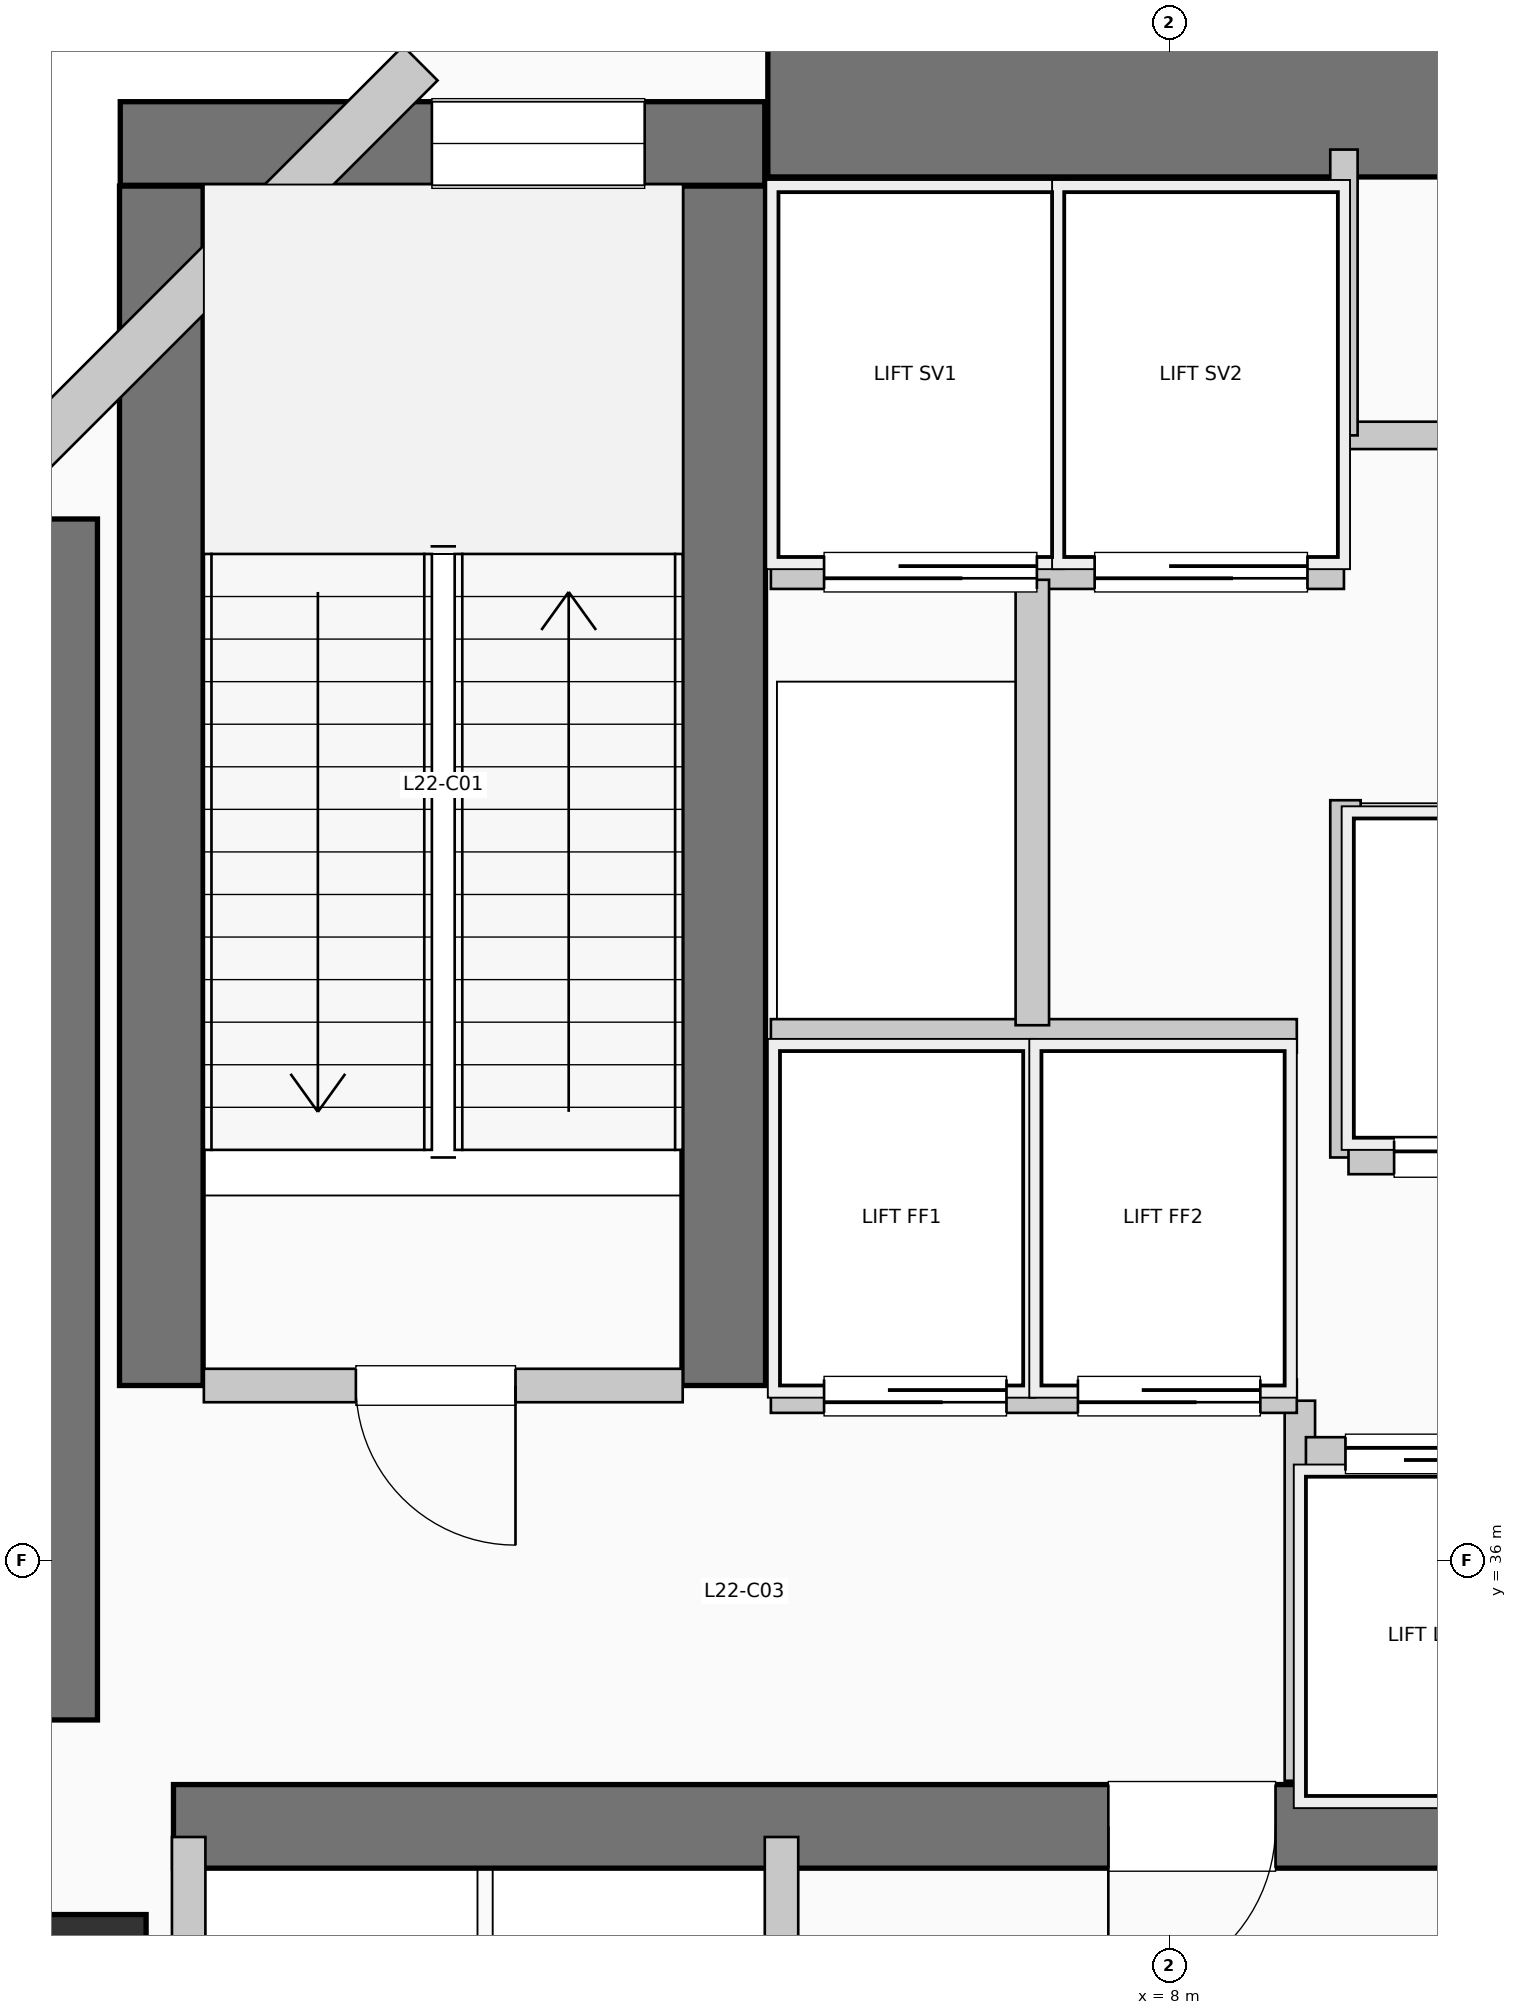
"""IFC4 building model, lengths in metres.
Left out: names, types, materials, properties, quantities, classifications, styles, units other than length and angle.
Written with IfcOpenShell. Run it as: python <this file> out.ifc"""

import sys

from ifc_helpers import new_model, si_unit, direction, frame, frame_2d, origin, origin_2d, place, context, subcontext, project, spatial, rectangle, extrude, element, fill, save


model = new_model("IFC4")
c1 = context("Model", 3, precision=1e-05, world=origin(), true_north=direction((0.0, 1.0)))
c2 = subcontext(c1, "Body", "Model", "MODEL_VIEW")
j1 = project(units=[si_unit("LENGTHUNIT", "METRE"), si_unit("PLANEANGLEUNIT", "RADIAN")], contexts=[c1])
p1 = place(None, origin())
s1 = spatial("IfcSite", under=j1, at=p1, CompositionType="ELEMENT")
p2 = place(p1, origin())
s2 = spatial("IfcBuilding", under=s1, at=p2, CompositionType="ELEMENT")
p3 = place(p2, frame((0.0, 0.0, 93.72)))
s3 = spatial("IfcBuildingStorey", under=s2, at=p3, CompositionType="ELEMENT", Elevation=93.72)
p4 = place(p3, frame((5.36, 45.55, 0.0), z_axis=(0.0, 0.0, 1.0), x_axis=(1.0, 0.0, 0.0)))
e1 = element("IfcWall", 1, at=p4, inside=s3, PredefinedType="SHEAR", context=c2, shape_type="SweptSolid", body=[
    extrude(rectangle(XDim=13.98, YDim=0.9, at=frame_2d((6.99, 0.0))), origin(), (0.0, 0.0, 1.0), 4.95),
])
p5 = place(p3, frame((0.5, 34.95, 0.0), z_axis=(0.0, 0.0, 1.0), x_axis=(0.0, 1.0, 0.0)))
e2 = element("IfcWall", 2, at=p5, inside=s3, PredefinedType="SHEAR", context=c2, shape_type="SweptSolid", body=[
    extrude(rectangle(XDim=7.9, YDim=0.9, at=frame_2d((3.95, 0.0))), origin(), (0.0, 0.0, 1.0), 4.95),
])
p6 = place(p3, frame((1.45, 34.25, 0.0), z_axis=(0.0, 0.0, 1.0), x_axis=(1.0, 0.0, 0.0)))
e3 = element("IfcWall", 3, at=p6, inside=s3, PredefinedType="SHEAR", context=c2, shape_type="SweptSolid", body=[
    extrude(rectangle(XDim=10.71, YDim=0.55, at=frame_2d((5.355, 0.0))), origin(), (0.0, 0.0, 1.0), 4.95),
])
p7 = place(p6, frame((7.25, 0.0, 0.0), z_axis=(0.0, 0.0, 1.0), x_axis=(-1.0, 0.0, 0.0)))
e4 = element("IfcOpeningElement", 4, at=p7, cuts=e3, PredefinedType="OPENING", context=c2, shape_type="SweptSolid", body=[
    extrude(rectangle(XDim=1.1, YDim=2.15, at=frame_2d((0.55, 1.075))), frame((0.0, 0.285, 0.0), z_axis=(0.0, -1.0, 0.0), x_axis=(1.0, 0.0, 0.0)), (0.0, 0.0, 1.0), 0.57),
])
for number, where, z_axis, x_axis in (
    (5, (1.37, 37.15, 0.0), (0.0, 0.0, 1.0), (0.0, 1.0, 0.0)),
    (6, (5.07, 37.15, 0.0), (0.0, 0.0, 1.0), (0.0, 1.0, 0.0)),
):
    element("IfcWall", number, at=place(p3, frame(where, z_axis=z_axis, x_axis=x_axis)), inside=s3, PredefinedType="SHEAR", context=c2, shape_type="SweptSolid", body=[
        extrude(rectangle(XDim=7.89, YDim=0.55, at=frame_2d((3.945, 0.0))), origin(), (0.0, 0.0, 1.0), 4.95),
    ])
p8 = place(p3, frame((1.1, 45.32, 0.0), z_axis=(0.0, 0.0, 1.0), x_axis=(1.0, 0.0, 0.0)))
e7 = element("IfcWall", 7, at=p8, inside=s3, PredefinedType="SHEAR", context=c2, shape_type="SweptSolid", body=[
    extrude(rectangle(XDim=4.24, YDim=0.55, at=frame_2d((2.12, 0.0))), origin(), (0.0, 0.0, 1.0), 4.95),
])
p9 = place(p8, frame((2.05, 0.0, 1.05)))
e8 = element("IfcOpeningElement", 8, at=p9, cuts=e7, PredefinedType="OPENING", context=c2, shape_type="SweptSolid", body=[
    extrude(rectangle(XDim=1.4, YDim=1.8, at=frame_2d((0.7, 0.9))), frame((0.0, 0.285, 0.0), z_axis=(0.0, -1.0, 0.0), x_axis=(1.0, 0.0, 0.0)), (0.0, 0.0, 1.0), 0.57),
])
p10 = place(p3, frame((0.8, 33.2, 0.0), z_axis=(0.0, 0.0, 1.0), x_axis=(1.0, 0.0, 0.0)))
e9 = element("IfcColumn", 9, at=p10, inside=s3, PredefinedType="COLUMN", context=c2, shape_type="SweptSolid", body=[
    extrude(rectangle(XDim=0.94, YDim=0.94, at=origin_2d()), origin(), (0.0, 0.0, 1.0), 4.95),
])
p11 = place(p3, frame((3.074, 45.848, 0.0), z_axis=(0.0, 0.0, 1.0), x_axis=(-0.707106781187, -0.707106781187, 0.0)))
e10 = element("IfcWall", 10, at=p11, inside=s3, PredefinedType="SOLIDWALL", context=c2, shape_type="SweptSolid", body=[
    extrude(rectangle(XDim=4.133, YDim=0.32, at=frame_2d((2.066, 0.0))), origin(), (0.0, 0.0, 1.0), 4.7),
])
p12 = place(p3, frame((1.65, 37.15, 0.0), z_axis=(0.0, 0.0, 1.0), x_axis=(1.0, 0.0, 0.0)))
e11 = element("IfcWall", 11, at=p12, inside=s3, PredefinedType="PARTITIONING", context=c2, shape_type="SweptSolid", body=[
    extrude(rectangle(XDim=3.15, YDim=0.22, at=frame_2d((1.575, 0.0))), origin(), (0.0, 0.0, 1.0), 4.7),
])
p13 = place(p12, frame((2.05, 0.0, 0.0), z_axis=(0.0, 0.0, 1.0), x_axis=(-1.0, 0.0, 0.0)))
e12 = element("IfcOpeningElement", 12, at=p13, cuts=e11, PredefinedType="OPENING", context=c2, shape_type="SweptSolid", body=[
    extrude(rectangle(XDim=1.05, YDim=2.15, at=frame_2d((0.525, 1.075))), frame((0.0, 0.12, 0.0), z_axis=(0.0, -1.0, 0.0), x_axis=(1.0, 0.0, 0.0)), (0.0, 0.0, 1.0), 0.24),
])
p14 = place(p3, frame((8.86, 34.55, 0.0), z_axis=(0.0, 0.0, 1.0), x_axis=(0.0, 1.0, 0.0)))
e13 = element("IfcWall", 13, at=p14, inside=s3, PredefinedType="PARTITIONING", context=c2, shape_type="SweptSolid", body=[
    extrude(rectangle(XDim=2.5, YDim=0.2, at=frame_2d((1.25, 0.0))), origin(), (0.0, 0.0, 1.0), 4.7),
])
p15 = place(p3, frame((5.38, 37.08, 0.0), z_axis=(0.0, 0.0, 1.0), x_axis=(1.0, 0.0, 0.0)))
e14 = element("IfcWall", 14, at=p15, inside=s3, PredefinedType="PARTITIONING", context=c2, shape_type="SweptSolid", body=[
    extrude(rectangle(XDim=3.46, YDim=0.22, at=frame_2d((1.73, 0.0))), origin(), (0.0, 0.0, 1.0), 4.7),
])
p16 = place(p15, frame((1.55, 0.0, 0.0), z_axis=(0.0, 0.0, 1.0), x_axis=(-1.0, 0.0, 0.0)))
e15 = element("IfcOpeningElement", 15, at=p16, cuts=e14, PredefinedType="OPENING", context=c2, shape_type="SweptSolid", body=[
    extrude(rectangle(XDim=1.2, YDim=2.2, at=frame_2d((0.6, 1.1))), frame((0.0, 0.12, 0.0), z_axis=(0.0, -1.0, 0.0), x_axis=(1.0, 0.0, 0.0)), (0.0, 0.0, 1.0), 0.24),
])
p17 = place(p15, frame((3.22, 0.0, 0.0), z_axis=(0.0, 0.0, 1.0), x_axis=(-1.0, 0.0, 0.0)))
e16 = element("IfcOpeningElement", 16, at=p17, cuts=e14, PredefinedType="OPENING", context=c2, shape_type="SweptSolid", body=[
    extrude(rectangle(XDim=1.2, YDim=2.2, at=frame_2d((0.6, 1.1))), frame((0.0, 0.12, 0.0), z_axis=(0.0, -1.0, 0.0), x_axis=(1.0, 0.0, 0.0)), (0.0, 0.0, 1.0), 0.24),
])
p18 = place(p3, frame((5.38, 39.45, 0.0), z_axis=(0.0, 0.0, 1.0), x_axis=(1.0, 0.0, 0.0)))
e17 = element("IfcWall", 17, at=p18, inside=s3, PredefinedType="PARTITIONING", context=c2, shape_type="SweptSolid", body=[
    extrude(rectangle(XDim=3.46, YDim=0.22, at=frame_2d((1.73, 0.0))), origin(), (0.0, 0.0, 1.0), 4.7),
])
p19 = place(p3, frame((5.38, 42.5, 0.0), z_axis=(0.0, 0.0, 1.0), x_axis=(1.0, 0.0, 0.0)))
e18 = element("IfcWall", 18, at=p19, inside=s3, PredefinedType="PARTITIONING", context=c2, shape_type="SweptSolid", body=[
    extrude(rectangle(XDim=3.77, YDim=0.22, at=frame_2d((1.885, 0.0))), origin(), (0.0, 0.0, 1.0), 4.7),
])
p20 = place(p19, frame((1.75, 0.0, 0.0), z_axis=(0.0, 0.0, 1.0), x_axis=(-1.0, 0.0, 0.0)))
e19 = element("IfcOpeningElement", 19, at=p20, cuts=e18, PredefinedType="OPENING", context=c2, shape_type="SweptSolid", body=[
    extrude(rectangle(XDim=1.4, YDim=2.2, at=frame_2d((0.7, 1.1))), frame((0.0, 0.12, 0.0), z_axis=(0.0, -1.0, 0.0), x_axis=(1.0, 0.0, 0.0)), (0.0, 0.0, 1.0), 0.24),
])
p21 = place(p19, frame((3.53, 0.0, 0.0), z_axis=(0.0, 0.0, 1.0), x_axis=(-1.0, 0.0, 0.0)))
e20 = element("IfcOpeningElement", 20, at=p21, cuts=e18, PredefinedType="OPENING", context=c2, shape_type="SweptSolid", body=[
    extrude(rectangle(XDim=1.4, YDim=2.2, at=frame_2d((0.7, 1.1))), frame((0.0, 0.12, 0.0), z_axis=(0.0, -1.0, 0.0), x_axis=(1.0, 0.0, 0.0)), (0.0, 0.0, 1.0), 0.24),
])
p22 = place(p3, frame((7.1, 39.52, 0.0), z_axis=(0.0, 0.0, 1.0), x_axis=(0.0, 1.0, 0.0)))
e21 = element("IfcWall", 21, at=p22, inside=s3, PredefinedType="PARTITIONING", context=c2, shape_type="SweptSolid", body=[
    extrude(rectangle(XDim=2.93, YDim=0.22, at=frame_2d((1.465, 0.0))), origin(), (0.0, 0.0, 1.0), 4.7),
])
for number, where, z_axis, x_axis in (
    (22, (1.55, 31.8, 0.0), (0.0, 0.0, 1.0), (0.0, 1.0, 0.0)),
    (23, (5.45, 31.8, 0.0), (0.0, 0.0, 1.0), (0.0, 1.0, 0.0)),
):
    element("IfcWall", number, at=place(p3, frame(where, z_axis=z_axis, x_axis=x_axis)), inside=s3, PredefinedType="PARTITIONING", context=c2, shape_type="SweptSolid", body=[
        extrude(rectangle(XDim=2.38, YDim=0.22, at=frame_2d((1.19, 0.0))), origin(), (0.0, 0.0, 1.0), 4.7),
    ])
p23 = place(p3, frame((9.16, 38.65, 0.0), z_axis=(0.0, 0.0, 1.0), x_axis=(0.0, 1.0, 0.0)))
e24 = element("IfcWall", 24, at=p23, inside=s3, PredefinedType="PARTITIONING", context=c2, shape_type="SweptSolid", body=[
    extrude(rectangle(XDim=2.35, YDim=0.2, at=frame_2d((1.175, 0.0))), origin(), (0.0, 0.0, 1.0), 4.7),
])
p24 = place(p3, frame((8.9, 36.7, 0.0), z_axis=(0.0, 0.0, 1.0), x_axis=(1.0, 0.0, 0.0)))
e25 = element("IfcWall", 25, at=p24, inside=s3, PredefinedType="PARTITIONING", context=c2, shape_type="SweptSolid", body=[
    extrude(rectangle(XDim=3.26, YDim=0.22, at=frame_2d((1.63, 0.0))), origin(), (0.0, 0.0, 1.0), 4.7),
])
p25 = place(p24, frame((0.26, 0.0, 0.0)))
e26 = element("IfcOpeningElement", 26, at=p25, cuts=e25, PredefinedType="OPENING", context=c2, shape_type="SweptSolid", body=[
    extrude(rectangle(XDim=1.1, YDim=2.2, at=frame_2d((0.55, 1.1))), frame((0.0, 0.12, 0.0), z_axis=(0.0, -1.0, 0.0), x_axis=(1.0, 0.0, 0.0)), (0.0, 0.0, 1.0), 0.24),
])
p26 = place(p24, frame((1.88, 0.0, 0.0)))
e27 = element("IfcOpeningElement", 27, at=p26, cuts=e25, PredefinedType="OPENING", context=c2, shape_type="SweptSolid", body=[
    extrude(rectangle(XDim=1.1, YDim=2.2, at=frame_2d((0.55, 1.1))), frame((0.0, 0.12, 0.0), z_axis=(0.0, -1.0, 0.0), x_axis=(1.0, 0.0, 0.0)), (0.0, 0.0, 1.0), 0.24),
])
p27 = place(p3, frame((9.18, 38.65, 0.0), z_axis=(0.0, 0.0, 1.0), x_axis=(1.0, 0.0, 0.0)))
e28 = element("IfcWall", 28, at=p27, inside=s3, PredefinedType="PARTITIONING", context=c2, shape_type="SweptSolid", body=[
    extrude(rectangle(XDim=3.38, YDim=0.22, at=frame_2d((1.69, 0.0))), origin(), (0.0, 0.0, 1.0), 4.7),
])
p28 = place(p27, frame((0.3, 0.0, 0.0)))
e29 = element("IfcOpeningElement", 29, at=p28, cuts=e28, PredefinedType="OPENING", context=c2, shape_type="SweptSolid", body=[
    extrude(rectangle(XDim=1.1, YDim=2.2, at=frame_2d((0.55, 1.1))), frame((0.0, 0.12, 0.0), z_axis=(0.0, -1.0, 0.0), x_axis=(1.0, 0.0, 0.0)), (0.0, 0.0, 1.0), 0.24),
])
p29 = place(p27, frame((1.95, 0.0, 0.0)))
e30 = element("IfcOpeningElement", 30, at=p29, cuts=e28, PredefinedType="OPENING", context=c2, shape_type="SweptSolid", body=[
    extrude(rectangle(XDim=1.1, YDim=2.2, at=frame_2d((0.55, 1.1))), frame((0.0, 0.12, 0.0), z_axis=(0.0, -1.0, 0.0), x_axis=(1.0, 0.0, 0.0)), (0.0, 0.0, 1.0), 0.24),
])
p30 = place(p3, frame((9.15, 43.4, 0.0), z_axis=(0.0, 0.0, 1.0), x_axis=(1.0, 0.0, 0.0)))
e31 = element("IfcWall", 31, at=p30, inside=s3, PredefinedType="PLUMBINGWALL", context=c2, shape_type="SweptSolid", body=[
    extrude(rectangle(XDim=9.33, YDim=0.18, at=frame_2d((4.665, 0.0))), origin(), (0.0, 0.0, 1.0), 4.7),
])
p31 = place(p30, frame((1.88, 0.0, 0.0)))
e32 = element("IfcOpeningElement", 32, at=p31, cuts=e31, PredefinedType="OPENING", context=c2, shape_type="SweptSolid", body=[
    extrude(rectangle(XDim=0.92, YDim=2.1, at=frame_2d((0.46, 1.05))), frame((0.0, 0.1, 0.0), z_axis=(0.0, -1.0, 0.0), x_axis=(1.0, 0.0, 0.0)), (0.0, 0.0, 1.0), 0.2),
])
p32 = place(p30, frame((6.515, 0.0, 0.0)))
e33 = element("IfcOpeningElement", 33, at=p32, cuts=e31, PredefinedType="OPENING", context=c2, shape_type="SweptSolid", body=[
    extrude(rectangle(XDim=0.92, YDim=2.1, at=frame_2d((0.46, 1.05))), frame((0.0, 0.1, 0.0), z_axis=(0.0, -1.0, 0.0), x_axis=(1.0, 0.0, 0.0)), (0.0, 0.0, 1.0), 0.2),
])
p33 = place(p3, frame((9.15, 43.4, 0.0), z_axis=(0.0, 0.0, 1.0), x_axis=(0.0, 1.0, 0.0)))
e34 = element("IfcWall", 34, at=p33, inside=s3, PredefinedType="PLUMBINGWALL", context=c2, shape_type="SweptSolid", body=[
    extrude(rectangle(XDim=1.88, YDim=0.18, at=frame_2d((0.94, 0.0))), origin(), (0.0, 0.0, 1.0), 4.7),
])
p34 = place(p9, origin())
e35 = element("IfcWindow", 35, at=p34, inside=s3, PartitioningType="SINGLE_PANEL", PredefinedType="WINDOW", context=c2, shape_type="SweptSolid", body=[
    extrude(rectangle(XDim=1.4, YDim=1.8, at=frame_2d((0.7, 0.9))), frame((0.0, 0.03, 0.0), z_axis=(0.0, -1.0, 0.0), x_axis=(1.0, 0.0, 0.0)), (0.0, 0.0, 1.0), 0.06),
])
fill(e8, e35)
p35 = place(p13, origin())
e36 = element("IfcDoor", 36, at=p35, inside=s3, OperationType="SINGLE_SWING_RIGHT", PredefinedType="DOOR", context=c2, shape_type="SweptSolid", body=[
    extrude(rectangle(XDim=1.05, YDim=2.15, at=frame_2d((0.525, 1.075))), frame((0.0, 0.025, 0.0), z_axis=(0.0, -1.0, 0.0), x_axis=(1.0, 0.0, 0.0)), (0.0, 0.0, 1.0), 0.05),
])
fill(e12, e36)
p36 = place(p7, origin())
e37 = element("IfcDoor", 37, at=p36, inside=s3, OperationType="SINGLE_SWING_LEFT", PredefinedType="DOOR", context=c2, shape_type="SweptSolid", body=[
    extrude(rectangle(XDim=1.1, YDim=2.15, at=frame_2d((0.55, 1.075))), frame((0.0, 0.025, 0.0), z_axis=(0.0, -1.0, 0.0), x_axis=(1.0, 0.0, 0.0)), (0.0, 0.0, 1.0), 0.05),
])
fill(e4, e37)
p37 = place(p16, origin())
e38 = element("IfcDoor", 38, at=p37, inside=s3, OperationType="SLIDING_TO_RIGHT", PredefinedType="DOOR", context=c2, shape_type="SweptSolid", body=[
    extrude(rectangle(XDim=1.2, YDim=2.2, at=frame_2d((0.6, 1.1))), frame((0.0, 0.025, 0.0), z_axis=(0.0, -1.0, 0.0), x_axis=(1.0, 0.0, 0.0)), (0.0, 0.0, 1.0), 0.05),
])
fill(e15, e38)
p38 = place(p17, origin())
e39 = element("IfcDoor", 39, at=p38, inside=s3, OperationType="SLIDING_TO_RIGHT", PredefinedType="DOOR", context=c2, shape_type="SweptSolid", body=[
    extrude(rectangle(XDim=1.2, YDim=2.2, at=frame_2d((0.6, 1.1))), frame((0.0, 0.025, 0.0), z_axis=(0.0, -1.0, 0.0), x_axis=(1.0, 0.0, 0.0)), (0.0, 0.0, 1.0), 0.05),
])
fill(e16, e39)
p39 = place(p20, origin())
e40 = element("IfcDoor", 40, at=p39, inside=s3, OperationType="SLIDING_TO_LEFT", PredefinedType="DOOR", context=c2, shape_type="SweptSolid", body=[
    extrude(rectangle(XDim=1.4, YDim=2.2, at=frame_2d((0.7, 1.1))), frame((0.0, 0.025, 0.0), z_axis=(0.0, -1.0, 0.0), x_axis=(1.0, 0.0, 0.0)), (0.0, 0.0, 1.0), 0.05),
])
fill(e19, e40)
p40 = place(p21, origin())
e41 = element("IfcDoor", 41, at=p40, inside=s3, OperationType="SLIDING_TO_LEFT", PredefinedType="DOOR", context=c2, shape_type="SweptSolid", body=[
    extrude(rectangle(XDim=1.4, YDim=2.2, at=frame_2d((0.7, 1.1))), frame((0.0, 0.025, 0.0), z_axis=(0.0, -1.0, 0.0), x_axis=(1.0, 0.0, 0.0)), (0.0, 0.0, 1.0), 0.05),
])
fill(e20, e41)
p41 = place(p25, origin())
e42 = element("IfcDoor", 42, at=p41, inside=s3, OperationType="SLIDING_TO_LEFT", PredefinedType="DOOR", context=c2, shape_type="SweptSolid", body=[
    extrude(rectangle(XDim=1.1, YDim=2.2, at=frame_2d((0.55, 1.1))), frame((0.0, 0.025, 0.0), z_axis=(0.0, -1.0, 0.0), x_axis=(1.0, 0.0, 0.0)), (0.0, 0.0, 1.0), 0.05),
])
fill(e26, e42)
p42 = place(p28, origin())
e43 = element("IfcDoor", 43, at=p42, inside=s3, OperationType="SLIDING_TO_LEFT", PredefinedType="DOOR", context=c2, shape_type="SweptSolid", body=[
    extrude(rectangle(XDim=1.1, YDim=2.2, at=frame_2d((0.55, 1.1))), frame((0.0, 0.025, 0.0), z_axis=(0.0, -1.0, 0.0), x_axis=(1.0, 0.0, 0.0)), (0.0, 0.0, 1.0), 0.05),
])
fill(e29, e43)
save(model, sys.argv[1])
